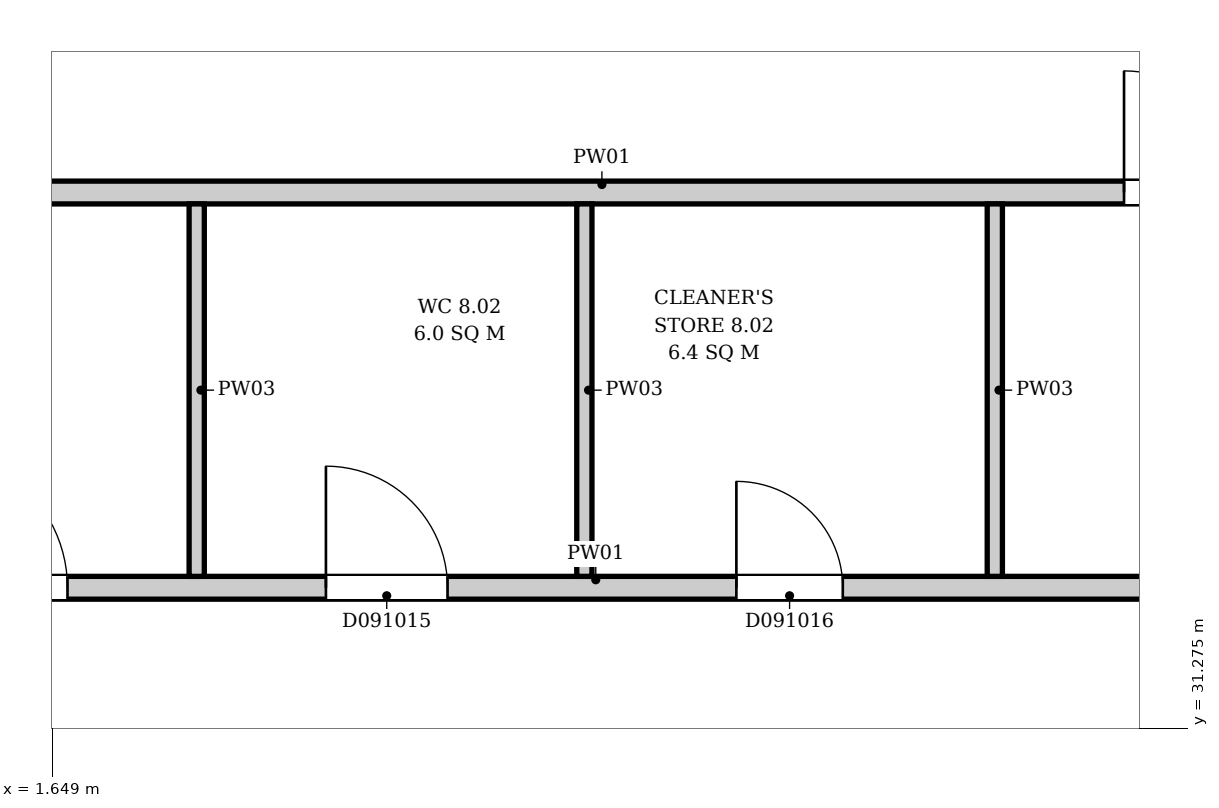
"""IFC4 building model, lengths in metres.
Left out: names, types, materials, properties, quantities, classifications, styles, units other than length and angle.
Written with IfcOpenShell. Run it as: python <this file> out.ifc"""

import sys

from ifc_helpers import new_model, si_unit, direction, frame, frame_2d, origin, place, context, subcontext, project, spatial, rectangle, extrude, element, fill, save


model = new_model("IFC4")
c1 = context("Model", 3, precision=1e-05, world=origin(), true_north=direction((0.0, 1.0)))
c2 = subcontext(c1, "Body", "Model", "MODEL_VIEW")
j1 = project(units=[si_unit("LENGTHUNIT", "METRE"), si_unit("PLANEANGLEUNIT", "RADIAN")], contexts=[c1])
p1 = place(None, origin())
s1 = spatial("IfcSite", under=j1, at=p1, CompositionType="ELEMENT")
p2 = place(p1, origin())
s2 = spatial("IfcBuilding", under=s1, at=p2, CompositionType="ELEMENT")
p3 = place(p2, frame((0.0, 0.0, 44.5)))
s3 = spatial("IfcBuildingStorey", under=s2, at=p3, CompositionType="ELEMENT", Elevation=44.5)
p4 = place(p3, frame((0.056, 32.2, 0.0), z_axis=(0.0, 0.0, 1.0), x_axis=(1.0, 0.0, 0.0)))
e1 = element("IfcWall", 1, at=p4, inside=s3, PredefinedType="PARTITIONING", context=c2, shape_type="SweptSolid", body=[
    extrude(rectangle(XDim=10.338, YDim=0.15, at=frame_2d((5.169, 0.0))), origin(), (0.0, 0.0, 1.0), 3.9),
])
p5 = place(p4, frame((0.794, 0.0, 0.0)))
e2 = element("IfcOpeningElement", 2, at=p5, cuts=e1, PredefinedType="OPENING", context=c2, shape_type="SweptSolid", body=[
    extrude(rectangle(XDim=0.9, YDim=2.1, at=frame_2d((0.45, 1.05))), frame((0.0, 0.085, 0.0), z_axis=(0.0, -1.0, 0.0), x_axis=(1.0, 0.0, 0.0)), (0.0, 0.0, 1.0), 0.17),
])
p6 = place(p4, frame((3.394, 0.0, 0.0)))
e3 = element("IfcOpeningElement", 3, at=p6, cuts=e1, PredefinedType="OPENING", context=c2, shape_type="SweptSolid", body=[
    extrude(rectangle(XDim=0.8, YDim=2.1, at=frame_2d((0.4, 1.05))), frame((0.0, 0.085, 0.0), z_axis=(0.0, -1.0, 0.0), x_axis=(1.0, 0.0, 0.0)), (0.0, 0.0, 1.0), 0.17),
])
p7 = place(p4, frame((6.094, 0.0, 0.0)))
e4 = element("IfcOpeningElement", 4, at=p7, cuts=e1, PredefinedType="OPENING", context=c2, shape_type="SweptSolid", body=[
    extrude(rectangle(XDim=0.7, YDim=2.1, at=frame_2d((0.35, 1.05))), frame((0.0, 0.085, 0.0), z_axis=(0.0, -1.0, 0.0), x_axis=(1.0, 0.0, 0.0)), (0.0, 0.0, 1.0), 0.17),
])
p8 = place(p3, frame((0.056, 34.8, 0.0), z_axis=(0.0, 0.0, 1.0), x_axis=(1.0, 0.0, 0.0)))
e5 = element("IfcWall", 5, at=p8, inside=s3, PredefinedType="PARTITIONING", context=c2, shape_type="SweptSolid", body=[
    extrude(rectangle(XDim=10.419, YDim=0.15, at=frame_2d((5.209, 0.0))), origin(), (0.0, 0.0, 1.0), 3.9),
])
p9 = place(p8, frame((8.644, 0.0, 0.0)))
e6 = element("IfcOpeningElement", 6, at=p9, cuts=e5, PredefinedType="OPENING", context=c2, shape_type="SweptSolid", body=[
    extrude(rectangle(XDim=0.8, YDim=2.1, at=frame_2d((0.4, 1.05))), frame((0.0, 0.085, 0.0), z_axis=(0.0, -1.0, 0.0), x_axis=(1.0, 0.0, 0.0)), (0.0, 0.0, 1.0), 0.17),
])
for number, where, z_axis, x_axis in (
    (7, (2.6, 32.275, 0.0), (0.0, 0.0, 1.0), (0.0, 1.0, 0.0)),
    (8, (5.15, 32.275, 0.0), (0.0, 0.0, 1.0), (0.0, 1.0, 0.0)),
    (9, (7.85, 32.275, 0.0), (0.0, 0.0, 1.0), (0.0, 1.0, 0.0)),
):
    element("IfcWall", number, at=place(p3, frame(where, z_axis=z_axis, x_axis=x_axis)), inside=s3, PredefinedType="PARTITIONING", context=c2, shape_type="SweptSolid", body=[
        extrude(rectangle(XDim=2.45, YDim=0.1, at=frame_2d((1.225, 0.0))), origin(), (0.0, 0.0, 1.0), 3.9),
    ])
p10 = place(p5, origin())
e10 = element("IfcDoor", 10, at=p10, inside=s3, OperationType="SINGLE_SWING_RIGHT", PredefinedType="DOOR", context=c2, shape_type="SweptSolid", body=[
    extrude(rectangle(XDim=0.9, YDim=2.1, at=frame_2d((0.45, 1.05))), frame((0.0, 0.025, 0.0), z_axis=(0.0, -1.0, 0.0), x_axis=(1.0, 0.0, 0.0)), (0.0, 0.0, 1.0), 0.05),
])
fill(e2, e10)
p11 = place(p6, origin())
e11 = element("IfcDoor", 11, at=p11, inside=s3, OperationType="SINGLE_SWING_RIGHT", PredefinedType="DOOR", context=c2, shape_type="SweptSolid", body=[
    extrude(rectangle(XDim=0.8, YDim=2.1, at=frame_2d((0.4, 1.05))), frame((0.0, 0.025, 0.0), z_axis=(0.0, -1.0, 0.0), x_axis=(1.0, 0.0, 0.0)), (0.0, 0.0, 1.0), 0.05),
])
fill(e3, e11)
p12 = place(p7, origin())
e12 = element("IfcDoor", 12, at=p12, inside=s3, OperationType="SINGLE_SWING_RIGHT", PredefinedType="DOOR", context=c2, shape_type="SweptSolid", body=[
    extrude(rectangle(XDim=0.7, YDim=2.1, at=frame_2d((0.35, 1.05))), frame((0.0, 0.025, 0.0), z_axis=(0.0, -1.0, 0.0), x_axis=(1.0, 0.0, 0.0)), (0.0, 0.0, 1.0), 0.05),
])
fill(e4, e12)
p13 = place(p9, origin())
e13 = element("IfcDoor", 13, at=p13, inside=s3, OperationType="SINGLE_SWING_LEFT", PredefinedType="DOOR", context=c2, shape_type="SweptSolid", body=[
    extrude(rectangle(XDim=0.8, YDim=2.1, at=frame_2d((0.4, 1.05))), frame((0.0, 0.025, 0.0), z_axis=(0.0, -1.0, 0.0), x_axis=(1.0, 0.0, 0.0)), (0.0, 0.0, 1.0), 0.05),
])
fill(e6, e13)
save(model, sys.argv[1])
